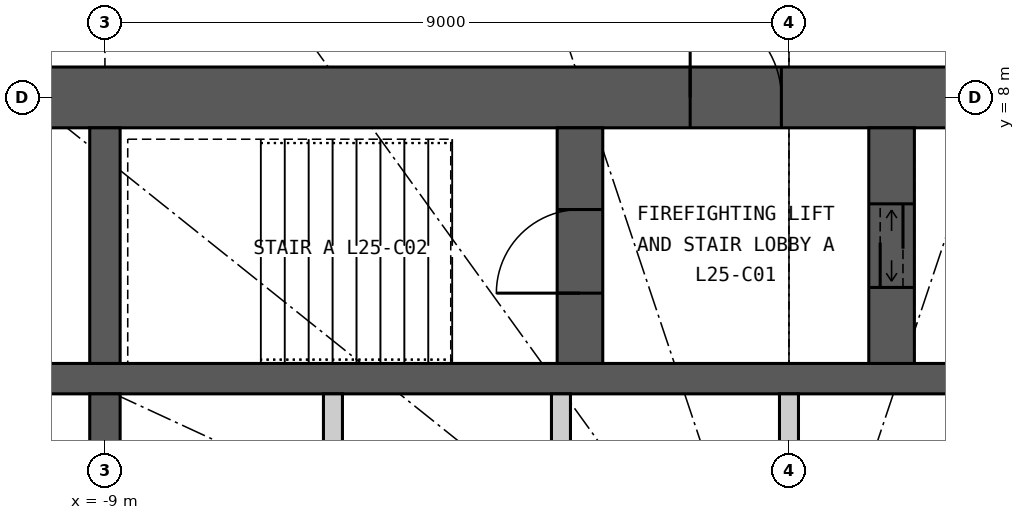
"""IFC4 building model, lengths in metres.
Left out: names, types, materials, properties, quantities, classifications, styles, units other than length and angle.
Written with IfcOpenShell. Run it as: python <this file> out.ifc"""

import sys

from ifc_helpers import new_model, si_unit, direction, frame, frame_2d, origin, place, context, subcontext, project, spatial, rectangle, extrude, element, fill, save


model = new_model("IFC4")
c1 = context("Model", 3, precision=1e-05, world=origin(), true_north=direction((0.0, 1.0)))
c2 = subcontext(c1, "Body", "Model", "MODEL_VIEW")
j1 = project(units=[si_unit("LENGTHUNIT", "METRE"), si_unit("PLANEANGLEUNIT", "RADIAN")], contexts=[c1])
p1 = place(None, origin())
s1 = spatial("IfcSite", under=j1, at=p1, CompositionType="ELEMENT")
p2 = place(p1, origin())
s2 = spatial("IfcBuilding", under=s1, at=p2, CompositionType="ELEMENT")
p3 = place(p2, frame((0.0, 0.0, 100.2)))
s3 = spatial("IfcBuildingStorey", under=s2, at=p3, CompositionType="ELEMENT", Elevation=100.2)
p4 = place(p3, frame((-12.4, 8.0, 0.0), z_axis=(0.0, 0.0, 1.0), x_axis=(1.0, 0.0, 0.0)))
e1 = element("IfcWall", 1, at=p4, inside=s3, PredefinedType="SHEAR", context=c2, shape_type="SweptSolid", body=[
    extrude(rectangle(XDim=24.8, YDim=0.8, at=frame_2d((12.4, 0.0))), origin(), (0.0, 0.0, 1.0), 5.4),
])
p5 = place(p4, frame((11.1, 0.0, 0.0)))
e2 = element("IfcOpeningElement", 2, at=p5, cuts=e1, PredefinedType="OPENING", context=c2, shape_type="SweptSolid", body=[
    extrude(rectangle(XDim=1.2, YDim=2.2, at=frame_2d((0.6, 1.1))), frame((0.0, 0.41, 0.0), z_axis=(0.0, -1.0, 0.0), x_axis=(1.0, 0.0, 0.0)), (0.0, 0.0, 1.0), 0.82),
])
p6 = place(p4, frame((18.7, 0.0, 0.0)))
e3 = element("IfcOpeningElement", 3, at=p6, cuts=e1, PredefinedType="OPENING", context=c2, shape_type="SweptSolid", body=[
    extrude(rectangle(XDim=0.9, YDim=2.2, at=frame_2d((0.45, 1.1))), frame((0.0, 0.41, 0.0), z_axis=(0.0, -1.0, 0.0), x_axis=(1.0, 0.0, 0.0)), (0.0, 0.0, 1.0), 0.82),
])
p7 = place(p3, frame((-11.6, 4.3, 0.0), z_axis=(0.0, 0.0, 1.0), x_axis=(1.0, 0.0, 0.0)))
e4 = element("IfcWall", 4, at=p7, inside=s3, PredefinedType="SHEAR", context=c2, shape_type="SweptSolid", body=[
    extrude(rectangle(XDim=23.2, YDim=0.4, at=frame_2d((11.6, 0.0))), origin(), (0.0, 0.0, 1.0), 5.4),
])
p8 = place(p3, frame((-9.0, 4.5, 0.0), z_axis=(0.0, 0.0, 1.0), x_axis=(0.0, 1.0, 0.0)))
e5 = element("IfcWall", 5, at=p8, inside=s3, PredefinedType="SHEAR", context=c2, shape_type="SweptSolid", body=[
    extrude(rectangle(XDim=3.1, YDim=0.4, at=frame_2d((1.55, 0.0))), origin(), (0.0, 0.0, 1.0), 5.4),
])
p9 = place(p3, frame((-9.0, 1.75, 0.0), z_axis=(0.0, 0.0, 1.0), x_axis=(0.0, 1.0, 0.0)))
e6 = element("IfcWall", 6, at=p9, inside=s3, PredefinedType="SHEAR", context=c2, shape_type="SweptSolid", body=[
    extrude(rectangle(XDim=2.35, YDim=0.4, at=frame_2d((1.175, 0.0))), origin(), (0.0, 0.0, 1.0), 5.4),
])
p10 = place(p3, frame((-2.75, 4.5, 0.0), z_axis=(0.0, 0.0, 1.0), x_axis=(0.0, 1.0, 0.0)))
e7 = element("IfcWall", 7, at=p10, inside=s3, PredefinedType="SHEAR", context=c2, shape_type="SweptSolid", body=[
    extrude(rectangle(XDim=3.1, YDim=0.6, at=frame_2d((1.55, 0.0))), origin(), (0.0, 0.0, 1.0), 5.4),
])
p11 = place(p10, frame((0.925, 0.0, 0.0)))
e8 = element("IfcOpeningElement", 8, at=p11, cuts=e7, PredefinedType="OPENING", context=c2, shape_type="SweptSolid", body=[
    extrude(rectangle(XDim=1.1, YDim=2.2, at=frame_2d((0.55, 1.1))), frame((0.0, 0.31, 0.0), z_axis=(0.0, -1.0, 0.0), x_axis=(1.0, 0.0, 0.0)), (0.0, 0.0, 1.0), 0.62),
])
p12 = place(p3, frame((1.35, 4.5, 0.0), z_axis=(0.0, 0.0, 1.0), x_axis=(0.0, 1.0, 0.0)))
e9 = element("IfcWall", 9, at=p12, inside=s3, PredefinedType="SHEAR", context=c2, shape_type="SweptSolid", body=[
    extrude(rectangle(XDim=3.1, YDim=0.6, at=frame_2d((1.55, 0.0))), origin(), (0.0, 0.0, 1.0), 5.4),
])
p13 = place(p12, frame((1.0, 0.0, 0.0)))
e10 = element("IfcOpeningElement", 10, at=p13, cuts=e9, PredefinedType="OPENING", context=c2, shape_type="SweptSolid", body=[
    extrude(rectangle(XDim=1.1, YDim=2.2, at=frame_2d((0.55, 1.1))), frame((0.0, 0.31, 0.0), z_axis=(0.0, -1.0, 0.0), x_axis=(1.0, 0.0, 0.0)), (0.0, 0.0, 1.0), 0.62),
])
for number, where, z_axis, x_axis in (
    (11, (-6.0, 1.75, 0.0), (0.0, 0.0, 1.0), (0.0, 1.0, 0.0)),
    (12, (-3.0, 1.75, 0.0), (0.0, 0.0, 1.0), (0.0, 1.0, 0.0)),
    (13, (0.0, 1.75, 0.0), (0.0, 0.0, 1.0), (0.0, 1.0, 0.0)),
):
    element("IfcWall", number, at=place(p3, frame(where, z_axis=z_axis, x_axis=x_axis)), inside=s3, PredefinedType="PARTITIONING", context=c2, shape_type="SweptSolid", body=[
        extrude(rectangle(XDim=2.35, YDim=0.25, at=frame_2d((1.175, 0.0))), origin(), (0.0, 0.0, 1.0), 5.4),
    ])
p14 = place(p5, origin())
e14 = element("IfcDoor", 14, at=p14, inside=s3, OperationType="SINGLE_SWING_LEFT", PredefinedType="DOOR", context=c2, shape_type="SweptSolid", body=[
    extrude(rectangle(XDim=1.2, YDim=2.2, at=frame_2d((0.6, 1.1))), frame((0.0, 0.025, 0.0), z_axis=(0.0, -1.0, 0.0), x_axis=(1.0, 0.0, 0.0)), (0.0, 0.0, 1.0), 0.05),
])
fill(e2, e14)
p15 = place(p11, origin())
e15 = element("IfcDoor", 15, at=p15, inside=s3, OperationType="SINGLE_SWING_LEFT", PredefinedType="DOOR", context=c2, shape_type="SweptSolid", body=[
    extrude(rectangle(XDim=1.1, YDim=2.2, at=frame_2d((0.55, 1.1))), frame((0.0, 0.025, 0.0), z_axis=(0.0, -1.0, 0.0), x_axis=(1.0, 0.0, 0.0)), (0.0, 0.0, 1.0), 0.05),
])
fill(e8, e15)
p16 = place(p13, origin())
e16 = element("IfcDoor", 16, at=p16, inside=s3, OperationType="DOUBLE_DOOR_SLIDING", PredefinedType="DOOR", context=c2, shape_type="SweptSolid", body=[
    extrude(rectangle(XDim=1.1, YDim=2.2, at=frame_2d((0.55, 1.1))), frame((0.0, 0.025, 0.0), z_axis=(0.0, -1.0, 0.0), x_axis=(1.0, 0.0, 0.0)), (0.0, 0.0, 1.0), 0.05),
])
fill(e10, e16)
save(model, sys.argv[1])
